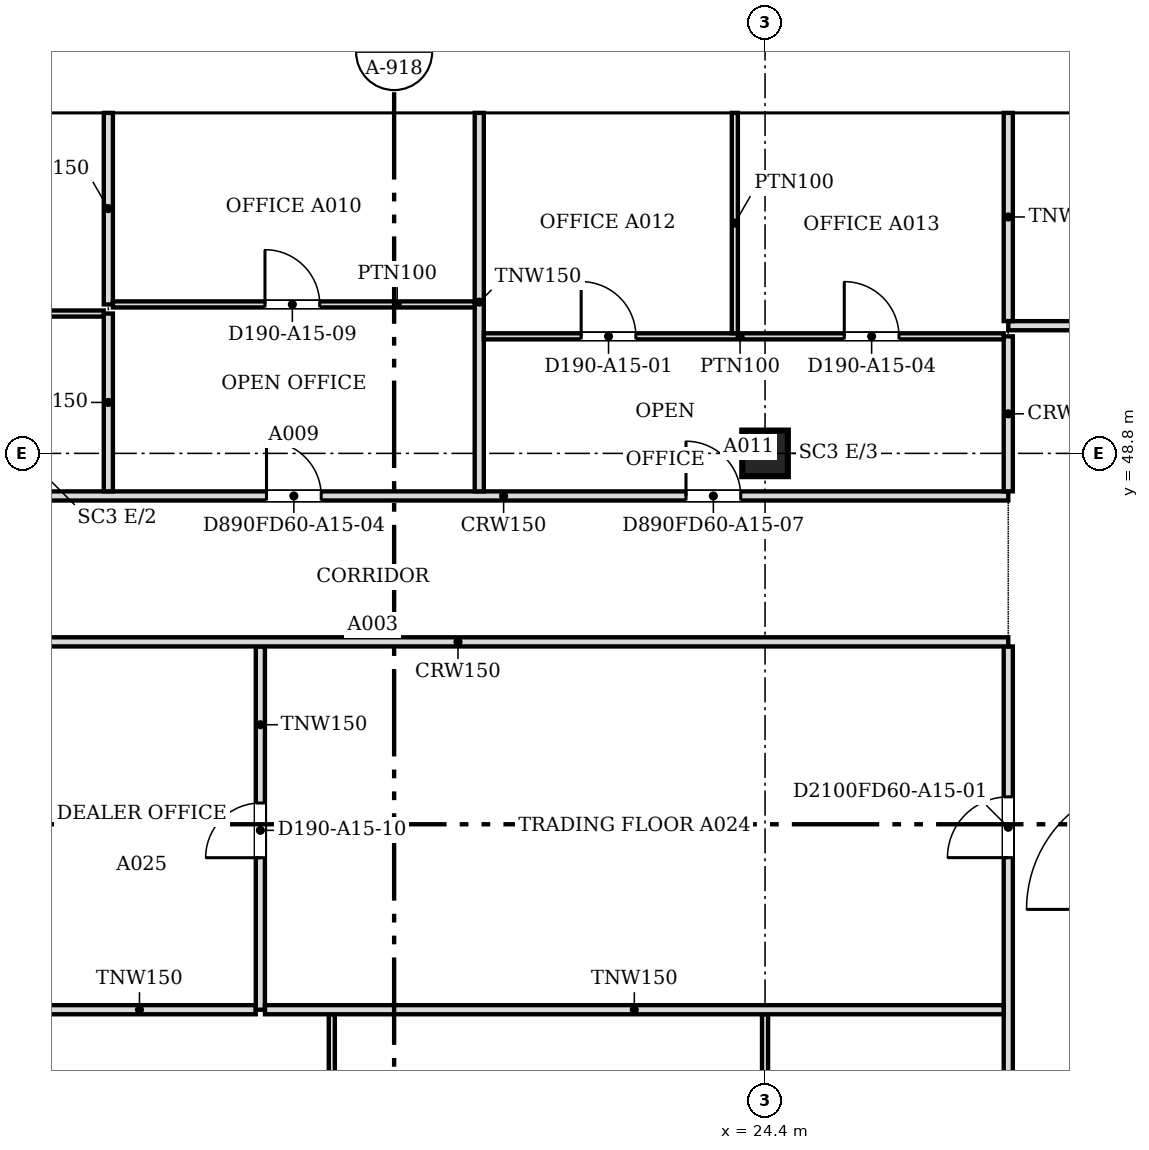
"""IFC4 building model, lengths in metres.
Left out: names, types, materials, properties, quantities, classifications, styles, units other than length and angle.
Written with IfcOpenShell. Run it as: python <this file> out.ifc"""

import sys

from ifc_helpers import new_model, si_unit, direction, frame, frame_2d, origin, origin_2d, place, context, subcontext, project, spatial, polyline, rectangle, outline, extrude, faceted_brep, source, transform, mapped, element, fill, save


model = new_model("IFC4")
c1 = context("Model", 3, precision=1e-05, world=origin(), true_north=direction((0.0, 1.0)))
c2 = subcontext(c1, "Body", "Model", "MODEL_VIEW")
j1 = project(units=[si_unit("LENGTHUNIT", "METRE"), si_unit("PLANEANGLEUNIT", "RADIAN")], contexts=[c1])
p1 = place(None, origin())
s1 = spatial("IfcSite", under=j1, at=p1, CompositionType="ELEMENT")
p2 = place(p1, origin())
s2 = spatial("IfcBuilding", under=s1, at=p2, CompositionType="ELEMENT")
p3 = place(p2, frame((0.0, 0.0, 166.8)))
s3 = spatial("IfcBuildingStorey", under=s2, at=p3, CompositionType="ELEMENT", Elevation=166.8)
p4 = place(p3, frame((24.4, 48.8, 0.0), z_axis=(0.0, 0.0, 1.0), x_axis=(1.0, 0.0, 0.0)))
e1 = element("IfcColumn", 1, at=p4, inside=s3, PredefinedType="COLUMN", context=c2, shape_type="SweptSolid", body=[
    extrude(rectangle(XDim=0.75, YDim=0.75, at=origin_2d()), origin(), (0.0, 0.0, 1.0), 3.6),
])
m1 = source(origin(), c2, "Body", "SweptSolid", [
    extrude(outline(polyline([(3.05, 0.0), (6.1, 3.8), (3.05, 7.6), (0.0, 3.8), (3.05, 0.0)])), frame((0.0, 0.25, 0.0), z_axis=(0.0, -1.0, 0.0), x_axis=(1.0, 0.0, 0.0)), (0.0, 0.0, 1.0), 0.5),
])
p5 = place(p3, frame((30.5, 54.65, -3.8), z_axis=(0.0, 0.0, 1.0), x_axis=(-1.0, 0.0, 0.0)))
e2 = element("IfcWall", 2, at=p5, inside=s3, PredefinedType="SOLIDWALL", context=c2, shape_type="MappedRepresentation", body=[
    mapped(m1, transform((0.0, 0.0, 0.0), scale=1.0)),
])
m2 = source(origin(), c2, "Body", "SweptSolid", [
    extrude(outline(polyline([(3.05, 0.399), (5.78, 3.8), (3.05, 7.201), (0.321, 3.8), (3.05, 0.399)])), frame((0.0, 0.26, 0.0), z_axis=(0.0, -1.0, 0.0), x_axis=(1.0, 0.0, 0.0)), (0.0, 0.0, 1.0), 0.52),
])
p6 = place(p5, origin())
e3 = element("IfcOpeningElement", 3, at=p6, cuts=e2, PredefinedType="OPENING", context=c2, shape_type="MappedRepresentation", body=[
    mapped(m2, transform((0.0, 0.0, 0.0), scale=1.0)),
])
m3 = source(origin(), c2, "Body", "Brep", [
    faceted_brep([(3.05, -0.25, 0.0), (6.1, -0.25, 3.8), (6.1, -0.25, 3.8), (3.05, -0.25, 7.6), (0.0, -0.25, 3.8), (0.0, 0.25, 3.8), (3.05, 0.25, 7.6), (6.1, 0.25, 3.8), (6.1, 0.25, 3.8), (3.05, 0.25, 0.0)], [[[0, 1, 2, 3, 4]], [[5, 6, 7, 8, 9]], [[9, 8, 1, 0]], [[7, 6, 3, 2]], [[6, 5, 4, 3]], [[5, 9, 0, 4]], [[1, 8, 7, 2]]]),
])
p7 = place(p3, frame((24.4, 54.65, -3.8), z_axis=(0.0, 0.0, 1.0), x_axis=(-1.0, 0.0, 0.0)))
e4 = element("IfcWall", 4, at=p7, inside=s3, PredefinedType="SOLIDWALL", context=c2, shape_type="MappedRepresentation", body=[
    mapped(m3, transform((0.0, 0.0, 0.0), scale=1.0)),
])
p8 = place(p7, origin())
e5 = element("IfcOpeningElement", 5, at=p8, cuts=e4, PredefinedType="OPENING", context=c2, shape_type="MappedRepresentation", body=[
    mapped(m2, transform((0.0, 0.0, 0.0), scale=1.0)),
])
p9 = place(p3, frame((18.3, 54.65, -3.8), z_axis=(0.0, 0.0, 1.0), x_axis=(-1.0, 0.0, 0.0)))
e6 = element("IfcWall", 6, at=p9, inside=s3, PredefinedType="SOLIDWALL", context=c2, shape_type="MappedRepresentation", body=[
    mapped(m1, transform((0.0, 0.0, 0.0), scale=1.0)),
])
p10 = place(p9, origin())
e7 = element("IfcOpeningElement", 7, at=p10, cuts=e6, PredefinedType="OPENING", context=c2, shape_type="MappedRepresentation", body=[
    mapped(m2, transform((0.0, 0.0, 0.0), scale=1.0)),
])
p11 = place(p2, frame((0.0, 0.0, 170.6)))
s4 = spatial("IfcBuildingStorey", under=s2, at=p11, CompositionType="ELEMENT", Elevation=170.6)
m4 = source(origin(), c2, "Body", "SweptSolid", [
    extrude(outline(polyline([(3.05, 0.0), (6.1, 3.8), (3.05, 7.6), (0.0, 3.8), (3.05, 0.0)])), frame((0.0, 0.25, 0.0), z_axis=(0.0, -1.0, 0.0), x_axis=(1.0, 0.0, 0.0)), (0.0, 0.0, 1.0), 0.5),
])
p12 = place(p11, frame((33.55, 54.65, -3.8), z_axis=(0.0, 0.0, 1.0), x_axis=(-1.0, 0.0, 0.0)))
e8 = element("IfcWall", 8, at=p12, inside=s4, PredefinedType="SOLIDWALL", context=c2, shape_type="MappedRepresentation", body=[
    mapped(m4, transform((0.0, 0.0, 0.0), scale=1.0)),
])
m5 = source(origin(), c2, "Body", "SweptSolid", [
    extrude(outline(polyline([(3.05, 0.399), (5.78, 3.8), (3.05, 7.2), (0.321, 3.8), (3.05, 0.399)])), frame((0.0, 0.26, 0.0), z_axis=(0.0, -1.0, 0.0), x_axis=(1.0, 0.0, 0.0)), (0.0, 0.0, 1.0), 0.52),
])
p13 = place(p12, origin())
e9 = element("IfcOpeningElement", 9, at=p13, cuts=e8, PredefinedType="OPENING", context=c2, shape_type="MappedRepresentation", body=[
    mapped(m5, transform((0.0, 0.0, 0.0), scale=1.0)),
])
m6 = source(origin(), c2, "Body", "Brep", [
    faceted_brep([(3.05, -0.25, 0.0), (6.1, -0.25, 3.8), (6.1, -0.25, 3.8), (3.05, -0.25, 7.6), (0.0, -0.25, 3.8), (0.0, 0.25, 3.8), (3.05, 0.25, 7.6), (6.1, 0.25, 3.8), (6.1, 0.25, 3.8), (3.05, 0.25, 0.0)], [[[0, 1, 2, 3, 4]], [[5, 6, 7, 8, 9]], [[9, 8, 1, 0]], [[7, 6, 3, 2]], [[6, 5, 4, 3]], [[5, 9, 0, 4]], [[1, 8, 7, 2]]]),
])
p14 = place(p11, frame((27.45, 54.65, -3.8), z_axis=(0.0, 0.0, 1.0), x_axis=(-1.0, 0.0, 0.0)))
e10 = element("IfcWall", 10, at=p14, inside=s4, PredefinedType="SOLIDWALL", context=c2, shape_type="MappedRepresentation", body=[
    mapped(m6, transform((0.0, 0.0, 0.0), scale=1.0)),
])
p15 = place(p14, origin())
e11 = element("IfcOpeningElement", 11, at=p15, cuts=e10, PredefinedType="OPENING", context=c2, shape_type="MappedRepresentation", body=[
    mapped(m5, transform((0.0, 0.0, 0.0), scale=1.0)),
])
p16 = place(p11, frame((21.35, 54.65, -3.8), z_axis=(0.0, 0.0, 1.0), x_axis=(-1.0, 0.0, 0.0)))
e12 = element("IfcWall", 12, at=p16, inside=s4, PredefinedType="SOLIDWALL", context=c2, shape_type="MappedRepresentation", body=[
    mapped(m4, transform((0.0, 0.0, 0.0), scale=1.0)),
])
p17 = place(p16, origin())
e13 = element("IfcOpeningElement", 13, at=p17, cuts=e12, PredefinedType="OPENING", context=c2, shape_type="MappedRepresentation", body=[
    mapped(m5, transform((0.0, 0.0, 0.0), scale=1.0)),
])
p18 = place(p11, frame((15.25, 54.65, -3.8), z_axis=(0.0, 0.0, 1.0), x_axis=(-1.0, 0.0, 0.0)))
e14 = element("IfcWall", 14, at=p18, inside=s4, PredefinedType="SOLIDWALL", context=c2, shape_type="MappedRepresentation", body=[
    mapped(m4, transform((0.0, 0.0, 0.0), scale=1.0)),
])
p19 = place(p18, origin())
e15 = element("IfcOpeningElement", 15, at=p19, cuts=e14, PredefinedType="OPENING", context=c2, shape_type="MappedRepresentation", body=[
    mapped(m5, transform((0.0, 0.0, 0.0), scale=1.0)),
])
p20 = place(p3, frame((28.4, 18.8, 0.0), z_axis=(0.0, 0.0, 1.0), x_axis=(0.0, 1.0, 0.0)))
e16 = element("IfcWall", 16, at=p20, inside=s3, PredefinedType="PARTITIONING", context=c2, shape_type="SweptSolid", body=[
    extrude(rectangle(XDim=26.824, YDim=0.15, at=frame_2d((13.412, 0.0))), origin(), (0.0, 0.0, 1.0), 3.067),
])
m7 = source(origin(), c2, "Body", "SweptSolid", [
    extrude(rectangle(XDim=0.9, YDim=2.1, at=frame_2d((0.45, 1.05))), frame((0.0, 0.085, 0.0), z_axis=(0.0, -1.0, 0.0), x_axis=(1.0, 0.0, 0.0)), (0.0, 0.0, 1.0), 0.17),
])
p21 = place(p20, frame((1.3, 0.0, 0.0)))
e17 = element("IfcOpeningElement", 17, at=p21, cuts=e16, PredefinedType="OPENING", context=c2, shape_type="MappedRepresentation", body=[
    mapped(m7, transform((0.0, 0.0, 0.0), scale=1.0)),
])
m8 = source(origin(), c2, "Body", "SweptSolid", [
    extrude(rectangle(XDim=1.0, YDim=2.1, at=frame_2d((0.5, 1.05))), frame((0.0, 0.085, 0.0), z_axis=(0.0, -1.0, 0.0), x_axis=(1.0, 0.0, 0.0)), (0.0, 0.0, 1.0), 0.17),
])
p22 = place(p20, frame((23.351, 0.0, 0.0)))
e18 = element("IfcOpeningElement", 18, at=p22, cuts=e16, PredefinedType="OPENING", context=c2, shape_type="MappedRepresentation", body=[
    mapped(m8, transform((0.0, 0.0, 0.0), scale=1.0)),
])
p23 = place(p20, frame((8.1, 0.0, 0.0)))
e19 = element("IfcOpeningElement", 19, at=p23, cuts=e16, PredefinedType="OPENING", context=c2, shape_type="MappedRepresentation", body=[
    mapped(m8, transform((0.0, 0.0, 0.0), scale=1.0)),
])
p24 = place(p20, frame((15.8, 0.0, 0.0)))
e20 = element("IfcOpeningElement", 20, at=p24, cuts=e16, PredefinedType="OPENING", context=c2, shape_type="MappedRepresentation", body=[
    mapped(m7, transform((0.0, 0.0, 0.0), scale=1.0)),
])
p25 = place(p3, frame((17.275, 34.971, 0.0), z_axis=(0.0, 0.0, 1.0), x_axis=(0.0, 1.0, 0.0)))
e21 = element("IfcWall", 21, at=p25, inside=s3, PredefinedType="PARTITIONING", context=c2, shape_type="SweptSolid", body=[
    extrude(rectangle(XDim=4.603, YDim=0.1, at=frame_2d((2.301, 0.0))), origin(), (0.0, 0.0, 1.0), 3.067),
])
m9 = source(origin(), c2, "Body", "SweptSolid", [
    extrude(rectangle(XDim=0.9, YDim=2.1, at=frame_2d((0.45, 1.05))), frame((0.0, 0.06, 0.0), z_axis=(0.0, -1.0, 0.0), x_axis=(1.0, 0.0, 0.0)), (0.0, 0.0, 1.0), 0.12),
])
p26 = place(p25, frame((1.9, 0.0, 0.0)))
e22 = element("IfcOpeningElement", 22, at=p26, cuts=e21, PredefinedType="OPENING", context=c2, shape_type="MappedRepresentation", body=[
    mapped(m9, transform((0.0, 0.0, 0.0), scale=1.0)),
])
p27 = place(p3, frame((24.4, 36.975, 0.0), z_axis=(0.0, 0.0, 1.0), x_axis=(0.0, 1.0, 0.0)))
e23 = element("IfcWall", 23, at=p27, inside=s3, PredefinedType="PARTITIONING", context=c2, shape_type="SweptSolid", body=[
    extrude(rectangle(XDim=2.6, YDim=0.1, at=frame_2d((1.3, 0.0))), origin(), (0.0, 0.0, 1.0), 3.067),
])
p28 = place(p3, frame((12.2, 39.65, 0.0), z_axis=(0.0, 0.0, 1.0), x_axis=(1.0, 0.0, 0.0)))
e24 = element("IfcWall", 24, at=p28, inside=s3, PredefinedType="PARTITIONING", context=c2, shape_type="SweptSolid", body=[
    extrude(rectangle(XDim=3.824, YDim=0.15, at=frame_2d((1.912, 0.0))), origin(), (0.0, 0.0, 1.0), 3.067),
])
p29 = place(p3, frame((16.1, 39.65, 0.0), z_axis=(0.0, 0.0, 1.0), x_axis=(0.0, 1.0, 0.0)))
e25 = element("IfcWall", 25, at=p29, inside=s3, PredefinedType="PARTITIONING", context=c2, shape_type="SweptSolid", body=[
    extrude(rectangle(XDim=5.974, YDim=0.15, at=frame_2d((2.987, 0.0))), origin(), (0.0, 0.0, 1.0), 3.067),
])
p30 = place(p29, frame((2.5, 0.0, 0.0)))
e26 = element("IfcOpeningElement", 26, at=p30, cuts=e25, PredefinedType="OPENING", context=c2, shape_type="MappedRepresentation", body=[
    mapped(m7, transform((0.0, 0.0, 0.0), scale=1.0)),
])
p31 = place(p3, frame((16.176, 39.65, 0.0), z_axis=(0.0, 0.0, 1.0), x_axis=(1.0, 0.0, 0.0)))
e27 = element("IfcWall", 27, at=p31, inside=s3, PredefinedType="PARTITIONING", context=c2, shape_type="SweptSolid", body=[
    extrude(rectangle(XDim=12.148, YDim=0.15, at=frame_2d((6.074, 0.0))), origin(), (0.0, 0.0, 1.0), 3.067),
])
p32 = place(p3, frame((28.4, 45.7, 0.0), z_axis=(0.0, 0.0, 1.0), x_axis=(-1.0, 0.0, 0.0)))
e28 = element("IfcWall", 28, at=p32, inside=s3, PredefinedType="PARTITIONING", context=c2, shape_type="SweptSolid", body=[
    extrude(rectangle(XDim=20.9, YDim=0.15, at=frame_2d((10.45, 0.0))), origin(), (0.0, 0.0, 1.0), 3.067),
])
p33 = place(p32, frame((18.1, 0.0, 0.0)))
e29 = element("IfcOpeningElement", 29, at=p33, cuts=e28, PredefinedType="OPENING", context=c2, shape_type="MappedRepresentation", body=[
    mapped(m7, transform((0.0, 0.0, 0.0), scale=1.0)),
])
p34 = place(p3, frame((7.5, 48.1, 0.0), z_axis=(0.0, 0.0, 1.0), x_axis=(1.0, 0.0, 0.0)))
e30 = element("IfcWall", 30, at=p34, inside=s3, PredefinedType="PARTITIONING", context=c2, shape_type="SweptSolid", body=[
    extrude(rectangle(XDim=20.9, YDim=0.15, at=frame_2d((10.45, 0.0))), origin(), (0.0, 0.0, 1.0), 3.067),
])
p35 = place(p34, frame((8.701, 0.0, 0.0)))
e31 = element("IfcOpeningElement", 31, at=p35, cuts=e30, PredefinedType="OPENING", context=c2, shape_type="MappedRepresentation", body=[
    mapped(m7, transform((0.0, 0.0, 0.0), scale=1.0)),
])
p36 = place(p34, frame((2.6, 0.0, 0.0)))
e32 = element("IfcOpeningElement", 32, at=p36, cuts=e30, PredefinedType="OPENING", context=c2, shape_type="MappedRepresentation", body=[
    mapped(m7, transform((0.0, 0.0, 0.0), scale=1.0)),
])
p37 = place(p34, frame((15.6, 0.0, 0.0)))
e33 = element("IfcOpeningElement", 33, at=p37, cuts=e30, PredefinedType="OPENING", context=c2, shape_type="MappedRepresentation", body=[
    mapped(m7, transform((0.0, 0.0, 0.0), scale=1.0)),
])
p38 = place(p3, frame((13.6, 48.176, 0.0), z_axis=(0.0, 0.0, 1.0), x_axis=(0.0, 1.0, 0.0)))
e34 = element("IfcWall", 34, at=p38, inside=s3, PredefinedType="PARTITIONING", context=c2, shape_type="SweptSolid", body=[
    extrude(rectangle(XDim=2.924, YDim=0.15, at=frame_2d((1.462, 0.0))), origin(), (0.0, 0.0, 1.0), 3.067),
])
p39 = place(p3, frame((19.7, 48.176, 0.0), z_axis=(0.0, 0.0, 1.0), x_axis=(0.0, 1.0, 0.0)))
e35 = element("IfcWall", 35, at=p39, inside=s3, PredefinedType="PARTITIONING", context=c2, shape_type="SweptSolid", body=[
    extrude(rectangle(XDim=6.224, YDim=0.15, at=frame_2d((3.112, 0.0))), origin(), (0.0, 0.0, 1.0), 3.067),
])
p40 = place(p3, frame((28.4, 48.176, 0.0), z_axis=(0.0, 0.0, 1.0), x_axis=(0.0, 1.0, 0.0)))
e36 = element("IfcWall", 36, at=p40, inside=s3, PredefinedType="PARTITIONING", context=c2, shape_type="SweptSolid", body=[
    extrude(rectangle(XDim=2.549, YDim=0.15, at=frame_2d((1.274, 0.0))), origin(), (0.0, 0.0, 1.0), 3.067),
])
p41 = place(p3, frame((19.776, 50.725, 0.0), z_axis=(0.0, 0.0, 1.0), x_axis=(1.0, 0.0, 0.0)))
e37 = element("IfcWall", 37, at=p41, inside=s3, PredefinedType="PARTITIONING", context=c2, shape_type="SweptSolid", body=[
    extrude(rectangle(XDim=8.548, YDim=0.1, at=frame_2d((4.274, 0.0))), origin(), (0.0, 0.0, 1.0), 3.067),
])
p42 = place(p41, frame((1.6, 0.0, 0.0)))
e38 = element("IfcOpeningElement", 38, at=p42, cuts=e37, PredefinedType="OPENING", context=c2, shape_type="MappedRepresentation", body=[
    mapped(m9, transform((0.0, 0.0, 0.0), scale=1.0)),
])
p43 = place(p41, frame((5.927, 0.0, 0.0)))
e39 = element("IfcOpeningElement", 39, at=p43, cuts=e37, PredefinedType="OPENING", context=c2, shape_type="MappedRepresentation", body=[
    mapped(m9, transform((0.0, 0.0, 0.0), scale=1.0)),
])
p44 = place(p3, frame((23.903, 50.776, 0.0), z_axis=(0.0, 0.0, 1.0), x_axis=(0.0, 1.0, 0.0)))
e40 = element("IfcWall", 40, at=p44, inside=s3, PredefinedType="PARTITIONING", context=c2, shape_type="SweptSolid", body=[
    extrude(rectangle(XDim=3.624, YDim=0.1, at=frame_2d((1.812, 0.0))), origin(), (0.0, 0.0, 1.0), 3.067),
])
p45 = place(p3, frame((28.4, 50.9, 0.0), z_axis=(0.0, 0.0, 1.0), x_axis=(1.0, 0.0, 0.0)))
e41 = element("IfcWall", 41, at=p45, inside=s3, PredefinedType="PARTITIONING", context=c2, shape_type="SweptSolid", body=[
    extrude(rectangle(XDim=31.254, YDim=0.15, at=frame_2d((15.627, 0.0))), origin(), (0.0, 0.0, 1.0), 3.067),
])
p46 = place(p45, frame((7.0, 0.0, 0.0)))
e42 = element("IfcOpeningElement", 42, at=p46, cuts=e41, PredefinedType="OPENING", context=c2, shape_type="MappedRepresentation", body=[
    mapped(m7, transform((0.0, 0.0, 0.0), scale=1.0)),
])
p47 = place(p45, frame((22.7, 0.0, 0.0)))
e43 = element("IfcOpeningElement", 43, at=p47, cuts=e41, PredefinedType="OPENING", context=c2, shape_type="MappedRepresentation", body=[
    mapped(m7, transform((0.0, 0.0, 0.0), scale=1.0)),
])
p48 = place(p3, frame((28.4, 50.976, 0.0), z_axis=(0.0, 0.0, 1.0), x_axis=(0.0, 1.0, 0.0)))
e44 = element("IfcWall", 44, at=p48, inside=s3, PredefinedType="PARTITIONING", context=c2, shape_type="SweptSolid", body=[
    extrude(rectangle(XDim=3.424, YDim=0.15, at=frame_2d((1.712, 0.0))), origin(), (0.0, 0.0, 1.0), 3.067),
])
p49 = place(p3, frame((7.5, 51.1, 0.0), z_axis=(0.0, 0.0, 1.0), x_axis=(1.0, 0.0, 0.0)))
e45 = element("IfcWall", 45, at=p49, inside=s3, PredefinedType="PARTITIONING", context=c2, shape_type="SweptSolid", body=[
    extrude(rectangle(XDim=6.024, YDim=0.1, at=frame_2d((3.012, 0.0))), origin(), (0.0, 0.0, 1.0), 3.067),
])
p50 = place(p49, frame((2.6, 0.0, 0.0)))
e46 = element("IfcOpeningElement", 46, at=p50, cuts=e45, PredefinedType="OPENING", context=c2, shape_type="MappedRepresentation", body=[
    mapped(m9, transform((0.0, 0.0, 0.0), scale=1.0)),
])
p51 = place(p3, frame((13.6, 51.25, 0.0), z_axis=(0.0, 0.0, 1.0), x_axis=(0.0, 1.0, 0.0)))
e47 = element("IfcWall", 47, at=p51, inside=s3, PredefinedType="PARTITIONING", context=c2, shape_type="SweptSolid", body=[
    extrude(rectangle(XDim=3.15, YDim=0.15, at=frame_2d((1.575, 0.0))), origin(), (0.0, 0.0, 1.0), 3.067),
])
p52 = place(p3, frame((13.676, 51.25, 0.0), z_axis=(0.0, 0.0, 1.0), x_axis=(1.0, 0.0, 0.0)))
e48 = element("IfcWall", 48, at=p52, inside=s3, PredefinedType="PARTITIONING", context=c2, shape_type="SweptSolid", body=[
    extrude(rectangle(XDim=5.948, YDim=0.1, at=frame_2d((2.974, 0.0))), origin(), (0.0, 0.0, 1.0), 3.067),
])
p53 = place(p52, frame((2.5, 0.0, 0.0)))
e49 = element("IfcOpeningElement", 49, at=p53, cuts=e48, PredefinedType="OPENING", context=c2, shape_type="MappedRepresentation", body=[
    mapped(m9, transform((0.0, 0.0, 0.0), scale=1.0)),
])
m10 = source(origin(), c2, "Body", "SweptSolid", [
    extrude(rectangle(XDim=0.9, YDim=2.1, at=frame_2d((0.45, 1.05))), frame((0.0, 0.025, 0.0), z_axis=(0.0, -1.0, 0.0), x_axis=(1.0, 0.0, 0.0)), (0.0, 0.0, 1.0), 0.05),
])
p54 = place(p42, origin())
e50 = element("IfcDoor", 50, at=p54, inside=s3, OperationType="SINGLE_SWING_LEFT", PredefinedType="DOOR", context=c2, shape_type="MappedRepresentation", body=[
    mapped(m10, transform((0.0, 0.0, 0.0), scale=1.0)),
])
fill(e38, e50)
p55 = place(p43, origin())
e51 = element("IfcDoor", 51, at=p55, inside=s3, OperationType="SINGLE_SWING_LEFT", PredefinedType="DOOR", context=c2, shape_type="MappedRepresentation", body=[
    mapped(m10, transform((0.0, 0.0, 0.0), scale=1.0)),
])
fill(e39, e51)
p56 = place(p53, origin())
e52 = element("IfcDoor", 52, at=p56, inside=s3, OperationType="SINGLE_SWING_LEFT", PredefinedType="DOOR", context=c2, shape_type="MappedRepresentation", body=[
    mapped(m10, transform((0.0, 0.0, 0.0), scale=1.0)),
])
fill(e49, e52)
m11 = source(origin(), c2, "Body", "SweptSolid", [
    extrude(rectangle(XDim=1.0, YDim=2.1, at=frame_2d((0.5, 1.05))), frame((0.0, 0.025, 0.0), z_axis=(0.0, -1.0, 0.0), x_axis=(1.0, 0.0, 0.0)), (0.0, 0.0, 1.0), 0.05),
])
p57 = place(p22, origin())
e53 = element("IfcDoor", 53, at=p57, inside=s3, OperationType="SINGLE_SWING_LEFT", PredefinedType="DOOR", context=c2, shape_type="MappedRepresentation", body=[
    mapped(m11, transform((0.0, 0.0, 0.0), scale=1.0)),
])
fill(e18, e53)
p58 = place(p30, origin())
e54 = element("IfcDoor", 54, at=p58, inside=s3, OperationType="SINGLE_SWING_LEFT", PredefinedType="DOOR", context=c2, shape_type="MappedRepresentation", body=[
    mapped(m10, transform((0.0, 0.0, 0.0), scale=1.0)),
])
fill(e26, e54)
p59 = place(p35, origin())
e55 = element("IfcDoor", 55, at=p59, inside=s3, OperationType="SINGLE_SWING_LEFT", PredefinedType="DOOR", context=c2, shape_type="MappedRepresentation", body=[
    mapped(m10, transform((0.0, 0.0, 0.0), scale=1.0)),
])
fill(e31, e55)
p60 = place(p37, origin())
e56 = element("IfcDoor", 56, at=p60, inside=s3, OperationType="SINGLE_SWING_LEFT", PredefinedType="DOOR", context=c2, shape_type="MappedRepresentation", body=[
    mapped(m10, transform((0.0, 0.0, 0.0), scale=1.0)),
])
fill(e33, e56)
save(model, sys.argv[1])
